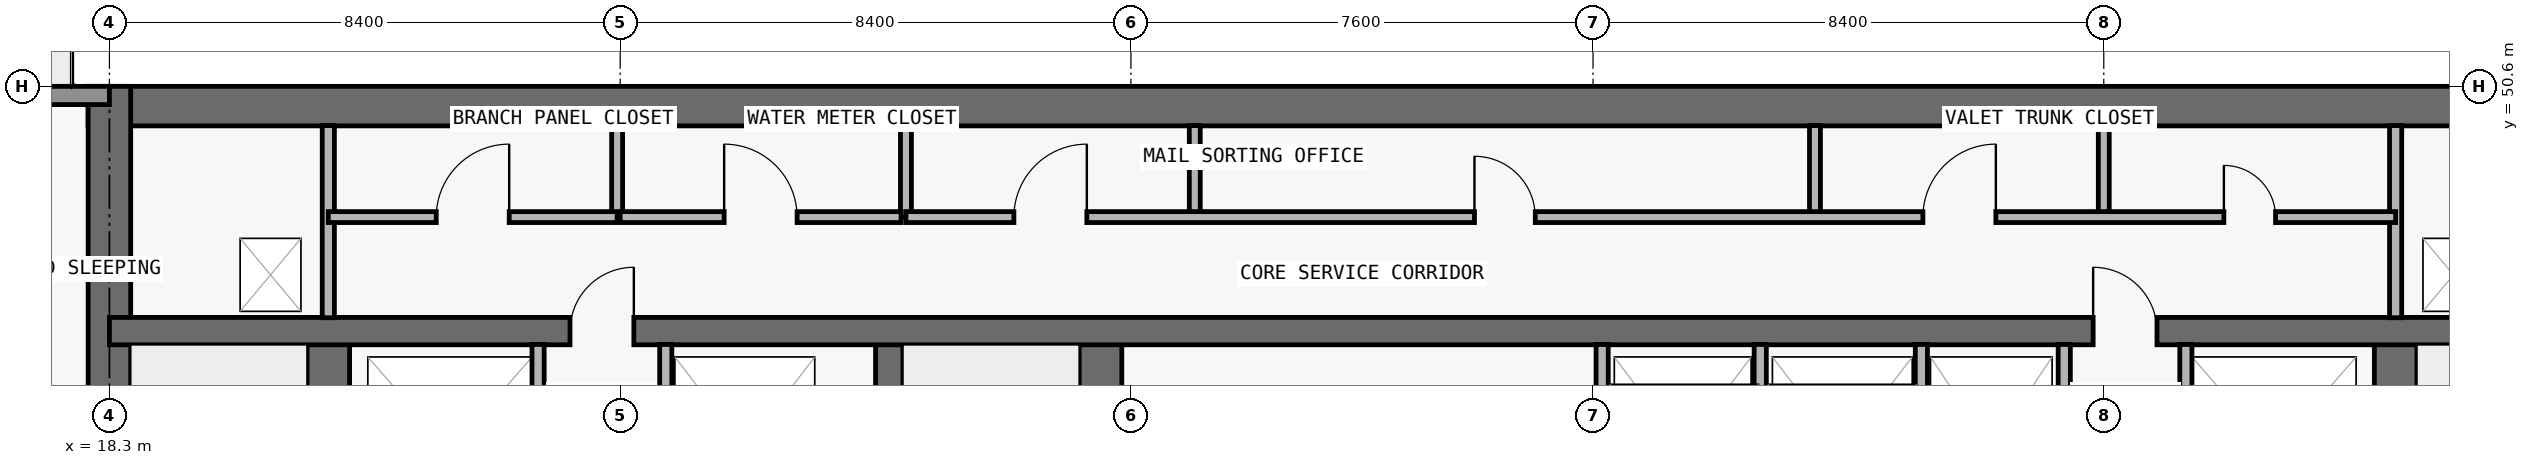
"""IFC4 building model, lengths in metres.
Left out: names, types, materials, properties, quantities, classifications, styles, units other than length and angle.
Written with IfcOpenShell. Run it as: python <this file> out.ifc"""

import sys

from ifc_helpers import new_model, si_unit, direction, frame, frame_2d, origin, place, context, subcontext, project, spatial, rectangle, extrude, element, fill, save


model = new_model("IFC4")
c1 = context("Model", 3, precision=1e-05, world=origin(), true_north=direction((0.0, 1.0)))
c2 = subcontext(c1, "Body", "Model", "MODEL_VIEW")
j1 = project(units=[si_unit("LENGTHUNIT", "METRE"), si_unit("PLANEANGLEUNIT", "RADIAN")], contexts=[c1])
p1 = place(None, origin())
s1 = spatial("IfcSite", under=j1, at=p1, CompositionType="ELEMENT")
p2 = place(p1, origin())
s2 = spatial("IfcBuilding", under=s1, at=p2, CompositionType="ELEMENT")
p3 = place(p2, frame((0.0, 0.0, 167.1)))
s3 = spatial("IfcBuildingStorey", under=s2, at=p3, CompositionType="ELEMENT", Elevation=167.1)
p4 = place(p3, frame((17.95, 50.275, 0.0), z_axis=(0.0, 0.0, 1.0), x_axis=(1.0, 0.0, 0.0)))
e1 = element("IfcWall", 1, at=p4, inside=s3, PredefinedType="SHEAR", context=c2, shape_type="SweptSolid", body=[
    extrude(rectangle(XDim=41.9, YDim=0.65, at=frame_2d((20.95, 0.0))), origin(), (0.0, 0.0, 1.0), 3.05),
])
p5 = place(p3, frame((18.3, 36.65, 0.0), z_axis=(0.0, 0.0, 1.0), x_axis=(0.0, 1.0, 0.0)))
e2 = element("IfcWall", 2, at=p5, inside=s3, PredefinedType="SHEAR", context=c2, shape_type="SweptSolid", body=[
    extrude(rectangle(XDim=13.95, YDim=0.7, at=frame_2d((6.975, 0.0))), origin(), (0.0, 0.0, 1.0), 3.05),
])
p6 = place(p3, frame((21.9, 37.0, 0.0), z_axis=(0.0, 0.0, 1.0), x_axis=(0.0, 1.0, 0.0)))
e3 = element("IfcWall", 3, at=p6, inside=s3, PredefinedType="SHEAR", context=c2, shape_type="SweptSolid", body=[
    extrude(rectangle(XDim=9.575, YDim=0.7, at=frame_2d((4.788, 0.0))), origin(), (0.0, 0.0, 1.0), 3.05),
])
p7 = place(p6, frame((0.55, 0.0, 0.0)))
e4 = element("IfcOpeningElement", 4, at=p7, cuts=e3, PredefinedType="OPENING", context=c2, shape_type="SweptSolid", body=[
    extrude(rectangle(XDim=1.1, YDim=2.15, at=frame_2d((0.55, 1.075))), frame((0.0, 0.36, 0.0), z_axis=(0.0, -1.0, 0.0), x_axis=(1.0, 0.0, 0.0)), (0.0, 0.0, 1.0), 0.72),
])
p8 = place(p3, frame((55.9, 37.0, 0.0), z_axis=(0.0, 0.0, 1.0), x_axis=(0.0, 1.0, 0.0)))
e5 = element("IfcWall", 5, at=p8, inside=s3, PredefinedType="SHEAR", context=c2, shape_type="SweptSolid", body=[
    extrude(rectangle(XDim=9.575, YDim=0.7, at=frame_2d((4.788, 0.0))), origin(), (0.0, 0.0, 1.0), 3.05),
])
p9 = place(p8, frame((0.55, 0.0, 0.0)))
e6 = element("IfcOpeningElement", 6, at=p9, cuts=e5, PredefinedType="OPENING", context=c2, shape_type="SweptSolid", body=[
    extrude(rectangle(XDim=1.1, YDim=2.15, at=frame_2d((0.55, 1.075))), frame((0.0, 0.36, 0.0), z_axis=(0.0, -1.0, 0.0), x_axis=(1.0, 0.0, 0.0)), (0.0, 0.0, 1.0), 0.72),
])
p10 = place(p3, frame((31.125, 37.0, 0.0), z_axis=(0.0, 0.0, 1.0), x_axis=(0.0, 1.0, 0.0)))
e7 = element("IfcWall", 7, at=p10, inside=s3, PredefinedType="SHEAR", context=c2, shape_type="SweptSolid", body=[
    extrude(rectangle(XDim=9.575, YDim=0.45, at=frame_2d((4.788, 0.0))), origin(), (0.0, 0.0, 1.0), 3.05),
])
p11 = place(p3, frame((34.6, 37.0, 0.0), z_axis=(0.0, 0.0, 1.0), x_axis=(0.0, 1.0, 0.0)))
e8 = element("IfcWall", 8, at=p11, inside=s3, PredefinedType="SHEAR", context=c2, shape_type="SweptSolid", body=[
    extrude(rectangle(XDim=9.575, YDim=0.7, at=frame_2d((4.788, 0.0))), origin(), (0.0, 0.0, 1.0), 3.05),
])
p12 = place(p3, frame((18.3, 46.575, 0.0), z_axis=(0.0, 0.0, 1.0), x_axis=(1.0, 0.0, 0.0)))
e9 = element("IfcWall", 9, at=p12, inside=s3, PredefinedType="SHEAR", context=c2, shape_type="SweptSolid", body=[
    extrude(rectangle(XDim=41.2, YDim=0.45, at=frame_2d((20.6, 0.0))), origin(), (0.0, 0.0, 1.0), 3.05),
])
p13 = place(p12, frame((7.575, 0.0, 0.0)))
e10 = element("IfcOpeningElement", 10, at=p13, cuts=e9, PredefinedType="OPENING", context=c2, shape_type="SweptSolid", body=[
    extrude(rectangle(XDim=1.05, YDim=2.15, at=frame_2d((0.525, 1.075))), frame((0.0, 0.235, 0.0), z_axis=(0.0, -1.0, 0.0), x_axis=(1.0, 0.0, 0.0)), (0.0, 0.0, 1.0), 0.47),
])
p14 = place(p12, frame((32.625, 0.0, 0.0)))
e11 = element("IfcOpeningElement", 11, at=p14, cuts=e9, PredefinedType="OPENING", context=c2, shape_type="SweptSolid", body=[
    extrude(rectangle(XDim=1.05, YDim=2.15, at=frame_2d((0.525, 1.075))), frame((0.0, 0.235, 0.0), z_axis=(0.0, -1.0, 0.0), x_axis=(1.0, 0.0, 0.0)), (0.0, 0.0, 1.0), 0.47),
])
p15 = place(p3, frame((10.1, 50.45, 0.0), z_axis=(0.0, 0.0, 1.0), x_axis=(1.0, 0.0, 0.0)))
e12 = element("IfcWall", 12, at=p15, inside=s3, PredefinedType="STANDARD", context=c2, shape_type="SweptSolid", body=[
    extrude(rectangle(XDim=8.2, YDim=0.3, at=frame_2d((4.1, 0.0))), origin(), (0.0, 0.0, 1.0), 3.05),
])
p16 = place(p15, frame((3.1, 0.0, 0.0)))
e13 = element("IfcOpeningElement", 13, at=p16, cuts=e12, PredefinedType="OPENING", context=c2, shape_type="SweptSolid", body=[
    extrude(rectangle(XDim=2.0, YDim=2.3, at=frame_2d((1.0, 1.15))), frame((0.0, 0.16, 0.0), z_axis=(0.0, -1.0, 0.0), x_axis=(1.0, 0.0, 0.0)), (0.0, 0.0, 1.0), 0.32),
])
p17 = place(p3, frame((21.9, 46.795, 0.0), z_axis=(0.0, 0.0, 1.0), x_axis=(0.0, 1.0, 0.0)))
e14 = element("IfcWall", 14, at=p17, inside=s3, PredefinedType="PARTITIONING", context=c2, shape_type="SweptSolid", body=[
    extrude(rectangle(XDim=3.16, YDim=0.2, at=frame_2d((1.58, 0.0))), origin(), (0.0, 0.0, 1.0), 3.05),
])
p18 = place(p3, frame((25.35, 43.17, 0.0), z_axis=(0.0, 0.0, 1.0), x_axis=(0.0, 1.0, 0.0)))
e15 = element("IfcWall", 15, at=p18, inside=s3, PredefinedType="PARTITIONING", context=c2, shape_type="SweptSolid", body=[
    extrude(rectangle(XDim=3.185, YDim=0.2, at=frame_2d((1.593, 0.0))), origin(), (0.0, 0.0, 1.0), 3.05),
])
p19 = place(p3, frame((26.65, 48.45, 0.0), z_axis=(0.0, 0.0, 1.0), x_axis=(0.0, 1.0, 0.0)))
e16 = element("IfcWall", 16, at=p19, inside=s3, PredefinedType="PARTITIONING", context=c2, shape_type="SweptSolid", body=[
    extrude(rectangle(XDim=1.505, YDim=0.18, at=frame_2d((0.752, 0.0))), origin(), (0.0, 0.0, 1.0), 3.05),
])
p20 = place(p3, frame((27.45, 43.17, 0.0), z_axis=(0.0, 0.0, 1.0), x_axis=(0.0, 1.0, 0.0)))
e17 = element("IfcWall", 17, at=p20, inside=s3, PredefinedType="PARTITIONING", context=c2, shape_type="SweptSolid", body=[
    extrude(rectangle(XDim=3.185, YDim=0.2, at=frame_2d((1.593, 0.0))), origin(), (0.0, 0.0, 1.0), 3.05),
])
for number, where, z_axis, x_axis in (
    (18, (31.4, 48.45, 0.0), (0.0, 0.0, 1.0), (0.0, 1.0, 0.0)),
    (19, (36.15, 48.45, 0.0), (0.0, 0.0, 1.0), (0.0, 1.0, 0.0)),
):
    element("IfcWall", number, at=place(p3, frame(where, z_axis=z_axis, x_axis=x_axis)), inside=s3, PredefinedType="PARTITIONING", context=c2, shape_type="SweptSolid", body=[
        extrude(rectangle(XDim=1.505, YDim=0.18, at=frame_2d((0.752, 0.0))), origin(), (0.0, 0.0, 1.0), 3.05),
    ])
for number, where, z_axis, x_axis in (
    (20, (42.85, 43.17, 0.0), (0.0, 0.0, 1.0), (0.0, 1.0, 0.0)),
    (21, (45.45, 43.17, 0.0), (0.0, 0.0, 1.0), (0.0, 1.0, 0.0)),
):
    element("IfcWall", number, at=place(p3, frame(where, z_axis=z_axis, x_axis=x_axis)), inside=s3, PredefinedType="PARTITIONING", context=c2, shape_type="SweptSolid", body=[
        extrude(rectangle(XDim=3.185, YDim=0.2, at=frame_2d((1.593, 0.0))), origin(), (0.0, 0.0, 1.0), 3.05),
    ])
p21 = place(p3, frame((46.35, 48.45, 0.0), z_axis=(0.0, 0.0, 1.0), x_axis=(0.0, 1.0, 0.0)))
e22 = element("IfcWall", 22, at=p21, inside=s3, PredefinedType="PARTITIONING", context=c2, shape_type="SweptSolid", body=[
    extrude(rectangle(XDim=1.505, YDim=0.18, at=frame_2d((0.752, 0.0))), origin(), (0.0, 0.0, 1.0), 3.05),
])
for number, where, z_axis, x_axis in (
    (23, (48.1, 43.17, 0.0), (0.0, 0.0, 1.0), (0.0, 1.0, 0.0)),
    (24, (50.45, 43.17, 0.0), (0.0, 0.0, 1.0), (0.0, 1.0, 0.0)),
):
    element("IfcWall", number, at=place(p3, frame(where, z_axis=z_axis, x_axis=x_axis)), inside=s3, PredefinedType="PARTITIONING", context=c2, shape_type="SweptSolid", body=[
        extrude(rectangle(XDim=3.185, YDim=0.2, at=frame_2d((1.593, 0.0))), origin(), (0.0, 0.0, 1.0), 3.05),
    ])
p22 = place(p3, frame((51.1, 48.45, 0.0), z_axis=(0.0, 0.0, 1.0), x_axis=(0.0, 1.0, 0.0)))
e25 = element("IfcWall", 25, at=p22, inside=s3, PredefinedType="PARTITIONING", context=c2, shape_type="SweptSolid", body=[
    extrude(rectangle(XDim=1.505, YDim=0.18, at=frame_2d((0.752, 0.0))), origin(), (0.0, 0.0, 1.0), 3.05),
])
p23 = place(p3, frame((52.45, 43.17, 0.0), z_axis=(0.0, 0.0, 1.0), x_axis=(0.0, 1.0, 0.0)))
e26 = element("IfcWall", 26, at=p23, inside=s3, PredefinedType="PARTITIONING", context=c2, shape_type="SweptSolid", body=[
    extrude(rectangle(XDim=3.185, YDim=0.2, at=frame_2d((1.593, 0.0))), origin(), (0.0, 0.0, 1.0), 3.05),
])
p24 = place(p3, frame((55.9, 46.795, 0.0), z_axis=(0.0, 0.0, 1.0), x_axis=(0.0, 1.0, 0.0)))
e27 = element("IfcWall", 27, at=p24, inside=s3, PredefinedType="PARTITIONING", context=c2, shape_type="SweptSolid", body=[
    extrude(rectangle(XDim=3.16, YDim=0.2, at=frame_2d((1.58, 0.0))), origin(), (0.0, 0.0, 1.0), 3.05),
])
p25 = place(p3, frame((21.9, 48.45, 0.0), z_axis=(0.0, 0.0, 1.0), x_axis=(1.0, 0.0, 0.0)))
e28 = element("IfcWall", 28, at=p25, inside=s3, PredefinedType="PARTITIONING", context=c2, shape_type="SweptSolid", body=[
    extrude(rectangle(XDim=4.75, YDim=0.18, at=frame_2d((2.375, 0.0))), origin(), (0.0, 0.0, 1.0), 3.05),
])
p26 = place(p25, frame((1.775, 0.0, 0.0)))
e29 = element("IfcOpeningElement", 29, at=p26, cuts=e28, PredefinedType="OPENING", context=c2, shape_type="SweptSolid", body=[
    extrude(rectangle(XDim=1.2, YDim=2.2, at=frame_2d((0.6, 1.1))), frame((0.0, 0.1, 0.0), z_axis=(0.0, -1.0, 0.0), x_axis=(1.0, 0.0, 0.0)), (0.0, 0.0, 1.0), 0.2),
])
p27 = place(p3, frame((26.7, 48.45, 0.0), z_axis=(0.0, 0.0, 1.0), x_axis=(1.0, 0.0, 0.0)))
e30 = element("IfcWall", 30, at=p27, inside=s3, PredefinedType="PARTITIONING", context=c2, shape_type="SweptSolid", body=[
    extrude(rectangle(XDim=4.62, YDim=0.18, at=frame_2d((2.31, 0.0))), origin(), (0.0, 0.0, 1.0), 3.05),
])
p28 = place(p27, frame((1.71, 0.0, 0.0)))
e31 = element("IfcOpeningElement", 31, at=p28, cuts=e30, PredefinedType="OPENING", context=c2, shape_type="SweptSolid", body=[
    extrude(rectangle(XDim=1.2, YDim=2.2, at=frame_2d((0.6, 1.1))), frame((0.0, 0.1, 0.0), z_axis=(0.0, -1.0, 0.0), x_axis=(1.0, 0.0, 0.0)), (0.0, 0.0, 1.0), 0.2),
])
p29 = place(p3, frame((31.4, 48.45, 0.0), z_axis=(0.0, 0.0, 1.0), x_axis=(1.0, 0.0, 0.0)))
e32 = element("IfcWall", 32, at=p29, inside=s3, PredefinedType="PARTITIONING", context=c2, shape_type="SweptSolid", body=[
    extrude(rectangle(XDim=24.5, YDim=0.18, at=frame_2d((12.25, 0.0))), origin(), (0.0, 0.0, 1.0), 3.05),
])
p30 = place(p29, frame((1.775, 0.0, 0.0)))
e33 = element("IfcOpeningElement", 33, at=p30, cuts=e32, PredefinedType="OPENING", context=c2, shape_type="SweptSolid", body=[
    extrude(rectangle(XDim=1.2, YDim=2.2, at=frame_2d((0.6, 1.1))), frame((0.0, 0.1, 0.0), z_axis=(0.0, -1.0, 0.0), x_axis=(1.0, 0.0, 0.0)), (0.0, 0.0, 1.0), 0.2),
])
p31 = place(p29, frame((9.35, 0.0, 0.0)))
e34 = element("IfcOpeningElement", 34, at=p31, cuts=e32, PredefinedType="OPENING", context=c2, shape_type="SweptSolid", body=[
    extrude(rectangle(XDim=1.0, YDim=2.2, at=frame_2d((0.5, 1.1))), frame((0.0, 0.1, 0.0), z_axis=(0.0, -1.0, 0.0), x_axis=(1.0, 0.0, 0.0)), (0.0, 0.0, 1.0), 0.2),
])
p32 = place(p29, frame((16.725, 0.0, 0.0)))
e35 = element("IfcOpeningElement", 35, at=p32, cuts=e32, PredefinedType="OPENING", context=c2, shape_type="SweptSolid", body=[
    extrude(rectangle(XDim=1.2, YDim=2.2, at=frame_2d((0.6, 1.1))), frame((0.0, 0.1, 0.0), z_axis=(0.0, -1.0, 0.0), x_axis=(1.0, 0.0, 0.0)), (0.0, 0.0, 1.0), 0.2),
])
p33 = place(p29, frame((21.675, 0.0, 0.0)))
e36 = element("IfcOpeningElement", 36, at=p33, cuts=e32, PredefinedType="OPENING", context=c2, shape_type="SweptSolid", body=[
    extrude(rectangle(XDim=0.85, YDim=2.1, at=frame_2d((0.425, 1.05))), frame((0.0, 0.1, 0.0), z_axis=(0.0, -1.0, 0.0), x_axis=(1.0, 0.0, 0.0)), (0.0, 0.0, 1.0), 0.2),
])
p34 = place(p13, origin())
e37 = element("IfcDoor", 37, at=p34, inside=s3, OperationType="SINGLE_SWING_RIGHT", PredefinedType="DOOR", context=c2, shape_type="SweptSolid", body=[
    extrude(rectangle(XDim=1.05, YDim=2.15, at=frame_2d((0.525, 1.075))), frame((0.0, 0.025, 0.0), z_axis=(0.0, -1.0, 0.0), x_axis=(1.0, 0.0, 0.0)), (0.0, 0.0, 1.0), 0.05),
])
fill(e10, e37)
p35 = place(p14, origin())
e38 = element("IfcDoor", 38, at=p35, inside=s3, OperationType="SINGLE_SWING_LEFT", PredefinedType="DOOR", context=c2, shape_type="SweptSolid", body=[
    extrude(rectangle(XDim=1.05, YDim=2.15, at=frame_2d((0.525, 1.075))), frame((0.0, 0.025, 0.0), z_axis=(0.0, -1.0, 0.0), x_axis=(1.0, 0.0, 0.0)), (0.0, 0.0, 1.0), 0.05),
])
fill(e11, e38)
p36 = place(p26, origin())
e39 = element("IfcDoor", 39, at=p36, inside=s3, OperationType="SINGLE_SWING_RIGHT", PredefinedType="DOOR", context=c2, shape_type="SweptSolid", body=[
    extrude(rectangle(XDim=1.2, YDim=2.2, at=frame_2d((0.6, 1.1))), frame((0.0, 0.025, 0.0), z_axis=(0.0, -1.0, 0.0), x_axis=(1.0, 0.0, 0.0)), (0.0, 0.0, 1.0), 0.05),
])
fill(e29, e39)
p37 = place(p28, origin())
e40 = element("IfcDoor", 40, at=p37, inside=s3, OperationType="SINGLE_SWING_LEFT", PredefinedType="DOOR", context=c2, shape_type="SweptSolid", body=[
    extrude(rectangle(XDim=1.2, YDim=2.2, at=frame_2d((0.6, 1.1))), frame((0.0, 0.025, 0.0), z_axis=(0.0, -1.0, 0.0), x_axis=(1.0, 0.0, 0.0)), (0.0, 0.0, 1.0), 0.05),
])
fill(e31, e40)
p38 = place(p30, origin())
e41 = element("IfcDoor", 41, at=p38, inside=s3, OperationType="SINGLE_SWING_RIGHT", PredefinedType="DOOR", context=c2, shape_type="SweptSolid", body=[
    extrude(rectangle(XDim=1.2, YDim=2.2, at=frame_2d((0.6, 1.1))), frame((0.0, 0.025, 0.0), z_axis=(0.0, -1.0, 0.0), x_axis=(1.0, 0.0, 0.0)), (0.0, 0.0, 1.0), 0.05),
])
fill(e33, e41)
p39 = place(p31, origin())
e42 = element("IfcDoor", 42, at=p39, inside=s3, OperationType="SINGLE_SWING_LEFT", PredefinedType="DOOR", context=c2, shape_type="SweptSolid", body=[
    extrude(rectangle(XDim=1.0, YDim=2.2, at=frame_2d((0.5, 1.1))), frame((0.0, 0.025, 0.0), z_axis=(0.0, -1.0, 0.0), x_axis=(1.0, 0.0, 0.0)), (0.0, 0.0, 1.0), 0.05),
])
fill(e34, e42)
p40 = place(p32, origin())
e43 = element("IfcDoor", 43, at=p40, inside=s3, OperationType="SINGLE_SWING_RIGHT", PredefinedType="DOOR", context=c2, shape_type="SweptSolid", body=[
    extrude(rectangle(XDim=1.2, YDim=2.2, at=frame_2d((0.6, 1.1))), frame((0.0, 0.025, 0.0), z_axis=(0.0, -1.0, 0.0), x_axis=(1.0, 0.0, 0.0)), (0.0, 0.0, 1.0), 0.05),
])
fill(e35, e43)
p41 = place(p33, origin())
e44 = element("IfcDoor", 44, at=p41, inside=s3, OperationType="SINGLE_SWING_LEFT", PredefinedType="DOOR", context=c2, shape_type="SweptSolid", body=[
    extrude(rectangle(XDim=0.85, YDim=2.1, at=frame_2d((0.425, 1.05))), frame((0.0, 0.025, 0.0), z_axis=(0.0, -1.0, 0.0), x_axis=(1.0, 0.0, 0.0)), (0.0, 0.0, 1.0), 0.05),
])
fill(e36, e44)
save(model, sys.argv[1])
